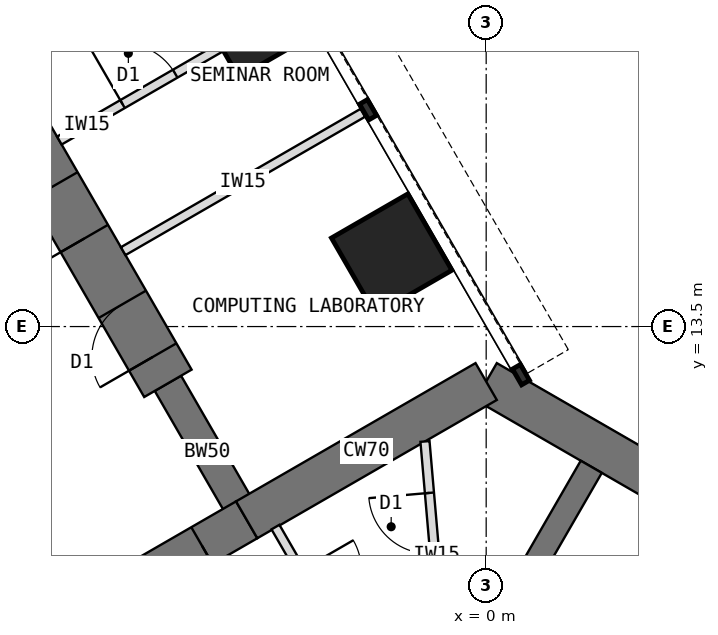
"""IFC4 building model, lengths in metres.
Left out: names, types, materials, properties, quantities, classifications, styles, units other than length and angle.
Written with IfcOpenShell. Run it as: python <this file> out.ifc"""

import sys

from ifc_helpers import new_model, si_unit, direction, frame, frame_2d, origin, origin_2d, place, context, subcontext, project, spatial, rectangle, extrude, element, fill, save


model = new_model("IFC4")
c1 = context("Model", 3, precision=1e-05, world=origin(), true_north=direction((0.0, 1.0)))
c2 = subcontext(c1, "Body", "Model", "MODEL_VIEW")
j1 = project(units=[si_unit("LENGTHUNIT", "METRE"), si_unit("PLANEANGLEUNIT", "RADIAN")], contexts=[c1])
p1 = place(None, origin())
s1 = spatial("IfcSite", under=j1, at=p1, CompositionType="ELEMENT")
p2 = place(p1, origin())
s2 = spatial("IfcBuilding", under=s1, at=p2, CompositionType="ELEMENT")
p3 = place(p2, frame((0.0, 0.0, 60.5)))
s3 = spatial("IfcBuildingStorey", under=s2, at=p3, CompositionType="ELEMENT", Elevation=60.5)
p4 = place(p3, frame((10.908, 6.298, 0.0), z_axis=(0.0, 0.0, 1.0), x_axis=(-0.866021940709, 0.500005998175, 0.0)))
e1 = element("IfcWall", 1, at=p4, inside=s3, PredefinedType="SHEAR", context=c2, shape_type="SweptSolid", body=[
    extrude(rectangle(XDim=12.596, YDim=0.7, at=frame_2d((6.298, 0.0))), origin(), (0.0, 0.0, 1.0), 4.0),
])
p5 = place(p3, frame((0.0, 12.596, 0.0), z_axis=(0.0, 0.0, 1.0), x_axis=(-0.866011268655, -0.500024481964, 0.0)))
e2 = element("IfcWall", 2, at=p5, inside=s3, PredefinedType="SHEAR", context=c2, shape_type="SweptSolid", body=[
    extrude(rectangle(XDim=4.548, YDim=0.7, at=frame_2d((2.274, 0.0))), origin(), (0.0, 0.0, 1.0), 4.0),
])
p6 = place(p3, frame((-3.939, 10.322, 0.0), z_axis=(0.0, 0.0, 1.0), x_axis=(-0.866019471182, -0.500010275428, 0.0)))
e3 = element("IfcWall", 3, at=p6, inside=s3, PredefinedType="SHEAR", context=c2, shape_type="SweptSolid", body=[
    extrude(rectangle(XDim=3.5, YDim=0.7, at=frame_2d((1.75, 0.0))), origin(), (0.0, 0.0, 1.0), 4.0),
])
p7 = place(p6, frame((0.85, 0.0, 0.0)))
e4 = element("IfcOpeningElement", 4, at=p7, cuts=e3, PredefinedType="OPENING", context=c2, shape_type="SweptSolid", body=[
    extrude(rectangle(XDim=1.8, YDim=2.1, at=frame_2d((0.9, 1.05))), frame((0.0, 0.36, 0.0), z_axis=(0.0, -1.0, 0.0), x_axis=(1.0, 0.0, 0.0)), (0.0, 0.0, 1.0), 0.72),
])
for number, where, z_axis, x_axis in (
    (5, (-6.97, 8.572, 0.0), (0.0, 0.0, 1.0), (-0.5, 0.866, 0.0)),
    (6, (-3.939, 10.322, 0.0), (0.0, 0.0, 1.0), (-0.5, 0.866, 0.0)),
):
    element("IfcWall", number, at=place(p3, frame(where, z_axis=z_axis, x_axis=x_axis)), inside=s3, PredefinedType="SHEAR", context=c2, shape_type="SweptSolid", body=[
        extrude(rectangle(XDim=2.592, YDim=0.5, at=frame_2d((1.296, 0.0))), origin(), (0.0, 0.0, 1.0), 4.0),
    ])
p8 = place(p3, frame((-5.234, 12.566, 0.0), z_axis=(0.0, 0.0, 1.0), x_axis=(-0.500010103361, 0.866019570528, 0.0)))
e7 = element("IfcWall", 7, at=p8, inside=s3, PredefinedType="SHEAR", context=c2, shape_type="SweptSolid", body=[
    extrude(rectangle(XDim=13.2, YDim=0.9, at=frame_2d((6.6, 0.0))), origin(), (0.0, 0.0, 1.0), 4.0),
])
p9 = place(p8, frame((0.5, 0.0, 0.0)))
e8 = element("IfcOpeningElement", 8, at=p9, cuts=e7, PredefinedType="OPENING", context=c2, shape_type="SweptSolid", body=[
    extrude(rectangle(XDim=1.0, YDim=2.1, at=frame_2d((0.5, 1.05))), frame((0.0, 0.46, 0.0), z_axis=(0.0, -1.0, 0.0), x_axis=(1.0, 0.0, 0.0)), (0.0, 0.0, 1.0), 0.92),
])
p10 = place(p8, frame((2.75, 0.0, 0.0)))
e9 = element("IfcOpeningElement", 9, at=p10, cuts=e7, PredefinedType="OPENING", context=c2, shape_type="SweptSolid", body=[
    extrude(rectangle(XDim=1.0, YDim=2.1, at=frame_2d((0.5, 1.05))), frame((0.0, 0.46, 0.0), z_axis=(0.0, -1.0, 0.0), x_axis=(1.0, 0.0, 0.0)), (0.0, 0.0, 1.0), 0.92),
])
p11 = place(p8, frame((7.25, 0.0, 0.0)))
e10 = element("IfcOpeningElement", 10, at=p11, cuts=e7, PredefinedType="OPENING", context=c2, shape_type="SweptSolid", body=[
    extrude(rectangle(XDim=1.0, YDim=2.1, at=frame_2d((0.5, 1.05))), frame((0.0, 0.46, 0.0), z_axis=(0.0, -1.0, 0.0), x_axis=(1.0, 0.0, 0.0)), (0.0, 0.0, 1.0), 0.92),
])
for number, where, z_axis, x_axis in (
    (11, (-1.554, 14.691, 0.0), (0.0, 0.0, 1.0), (0.866, 0.5, 0.0)),
    (12, (-3.804, 18.588, 0.0), (0.0, 0.0, 1.0), (0.866, 0.5, 0.0)),
):
    element("IfcColumn", number, at=place(p3, frame(where, z_axis=z_axis, x_axis=x_axis)), inside=s3, PredefinedType="COLUMN", context=c2, shape_type="SweptSolid", body=[
        extrude(rectangle(XDim=1.45, YDim=1.45, at=origin_2d()), origin(), (0.0, 0.0, 1.0), 4.0),
    ])
p12 = place(p3, frame((-1.201, 6.12, 0.0), z_axis=(0.0, 0.0, 1.0), x_axis=(0.500002627198, 0.866023886965, 0.0)))
e13 = element("IfcWall", 13, at=p12, inside=s3, PredefinedType="SHEAR", context=c2, shape_type="SweptSolid", body=[
    extrude(rectangle(XDim=5.858, YDim=0.4, at=frame_2d((2.929, 0.0))), origin(), (0.0, 0.0, 1.0), 4.0),
])
p13 = place(p3, frame((-5.97, 14.74, 0.0), z_axis=(0.0, 0.0, 1.0), x_axis=(0.866035472144, 0.499982560684, 0.0)))
e14 = element("IfcWall", 14, at=p13, inside=s3, PredefinedType="PARTITIONING", context=c2, shape_type="SweptSolid", body=[
    extrude(rectangle(XDim=4.55, YDim=0.15, at=frame_2d((2.275, 0.0))), origin(), (0.0, 0.0, 1.0), 3.8),
])
p14 = place(p3, frame((-7.02, 16.559, 0.0), z_axis=(0.0, 0.0, 1.0), x_axis=(0.866038511948, 0.499977295307, 0.0)))
e15 = element("IfcWall", 15, at=p14, inside=s3, PredefinedType="PARTITIONING", context=c2, shape_type="SweptSolid", body=[
    extrude(rectangle(XDim=3.4, YDim=0.15, at=frame_2d((1.7, 0.0))), origin(), (0.0, 0.0, 1.0), 3.8),
])
p15 = place(p14, frame((1.2, 0.0, 0.0)))
e16 = element("IfcOpeningElement", 16, at=p15, cuts=e15, PredefinedType="OPENING", context=c2, shape_type="SweptSolid", body=[
    extrude(rectangle(XDim=1.0, YDim=2.1, at=frame_2d((0.5, 1.05))), frame((0.0, 0.085, 0.0), z_axis=(0.0, -1.0, 0.0), x_axis=(1.0, 0.0, 0.0)), (0.0, 0.0, 1.0), 0.17),
])
p16 = place(p3, frame((-3.466, 10.202, 0.0), z_axis=(0.0, 0.0, 1.0), x_axis=(0.500007369519, -0.866021148949, 0.0)))
e17 = element("IfcWall", 17, at=p16, inside=s3, PredefinedType="PARTITIONING", context=c2, shape_type="SweptSolid", body=[
    extrude(rectangle(XDim=4.426, YDim=0.15, at=frame_2d((2.213, 0.0))), origin(), (0.0, 0.0, 1.0), 3.8),
])
p17 = place(p16, frame((0.828, 0.0, 0.0)))
e18 = element("IfcOpeningElement", 18, at=p17, cuts=e17, PredefinedType="OPENING", context=c2, shape_type="SweptSolid", body=[
    extrude(rectangle(XDim=1.0, YDim=2.1, at=frame_2d((0.5, 1.05))), frame((0.0, 0.085, 0.0), z_axis=(0.0, -1.0, 0.0), x_axis=(1.0, 0.0, 0.0)), (0.0, 0.0, 1.0), 0.17),
])
p18 = place(p3, frame((-0.618, 7.129, 0.0), z_axis=(0.0, 0.0, 1.0), x_axis=(-0.086409450071, 0.996259708579, 0.0)))
e19 = element("IfcWall", 19, at=p18, inside=s3, PredefinedType="PARTITIONING", context=c2, shape_type="SweptSolid", body=[
    extrude(rectangle(XDim=4.498, YDim=0.15, at=frame_2d((2.249, 0.0))), origin(), (0.0, 0.0, 1.0), 3.8),
])
p19 = place(p18, frame((2.648, 0.0, 0.0)))
e20 = element("IfcOpeningElement", 20, at=p19, cuts=e19, PredefinedType="OPENING", context=c2, shape_type="SweptSolid", body=[
    extrude(rectangle(XDim=1.0, YDim=2.1, at=frame_2d((0.5, 1.05))), frame((0.0, 0.085, 0.0), z_axis=(0.0, -1.0, 0.0), x_axis=(1.0, 0.0, 0.0)), (0.0, 0.0, 1.0), 0.17),
])
p20 = place(p7, origin())
e21 = element("IfcDoor", 21, at=p20, inside=s3, OperationType="DOUBLE_DOOR_DOUBLE_SWING", PredefinedType="DOOR", context=c2, shape_type="SweptSolid", body=[
    extrude(rectangle(XDim=1.72, YDim=2.06, at=frame_2d((0.9, 1.03))), frame((0.0, 0.025, 0.0), z_axis=(0.0, -1.0, 0.0), x_axis=(1.0, 0.0, 0.0)), (0.0, 0.0, 1.0), 0.05),
    extrude(rectangle(XDim=0.04, YDim=2.1, at=frame_2d((0.02, 1.05))), frame((0.0, 0.35, 0.0), z_axis=(0.0, -1.0, 0.0), x_axis=(1.0, 0.0, 0.0)), (0.0, 0.0, 1.0), 0.699),
    extrude(rectangle(XDim=0.04, YDim=2.1, at=frame_2d((1.78, 1.05))), frame((0.0, 0.35, 0.0), z_axis=(0.0, -1.0, 0.0), x_axis=(1.0, 0.0, 0.0)), (0.0, 0.0, 1.0), 0.699),
    extrude(rectangle(XDim=1.72, YDim=0.04, at=frame_2d((0.9, 2.08))), frame((0.0, 0.35, 0.0), z_axis=(0.0, -1.0, 0.0), x_axis=(1.0, 0.0, 0.0)), (0.0, 0.0, 1.0), 0.699),
])
fill(e4, e21)
p21 = place(p15, origin())
e22 = element("IfcDoor", 22, at=p21, inside=s3, OperationType="SINGLE_SWING_LEFT", PredefinedType="DOOR", context=c2, shape_type="SweptSolid", body=[
    extrude(rectangle(XDim=1.0, YDim=2.1, at=frame_2d((0.5, 1.05))), frame((0.0, 0.025, 0.0), z_axis=(0.0, -1.0, 0.0), x_axis=(1.0, 0.0, 0.0)), (0.0, 0.0, 1.0), 0.05),
])
fill(e16, e22)
p22 = place(p19, origin())
e23 = element("IfcDoor", 23, at=p22, inside=s3, OperationType="SINGLE_SWING_RIGHT", PredefinedType="DOOR", context=c2, shape_type="SweptSolid", body=[
    extrude(rectangle(XDim=1.0, YDim=2.1, at=frame_2d((0.5, 1.05))), frame((0.0, 0.025, 0.0), z_axis=(0.0, -1.0, 0.0), x_axis=(1.0, 0.0, 0.0)), (0.0, 0.0, 1.0), 0.05),
])
fill(e20, e23)
p23 = place(p9, origin())
e24 = element("IfcDoor", 24, at=p23, inside=s3, OperationType="SINGLE_SWING_LEFT", PredefinedType="DOOR", context=c2, shape_type="SweptSolid", body=[
    extrude(rectangle(XDim=0.92, YDim=2.06, at=frame_2d((0.5, 1.03))), frame((0.0, 0.025, 0.0), z_axis=(0.0, -1.0, 0.0), x_axis=(1.0, 0.0, 0.0)), (0.0, 0.0, 1.0), 0.05),
    extrude(rectangle(XDim=0.04, YDim=2.1, at=frame_2d((0.02, 1.05))), frame((0.0, 0.45, 0.0), z_axis=(0.0, -1.0, 0.0), x_axis=(1.0, 0.0, 0.0)), (0.0, 0.0, 1.0), 0.899),
    extrude(rectangle(XDim=0.04, YDim=2.1, at=frame_2d((0.98, 1.05))), frame((0.0, 0.45, 0.0), z_axis=(0.0, -1.0, 0.0), x_axis=(1.0, 0.0, 0.0)), (0.0, 0.0, 1.0), 0.899),
    extrude(rectangle(XDim=0.92, YDim=0.04, at=frame_2d((0.5, 2.08))), frame((0.0, 0.45, 0.0), z_axis=(0.0, -1.0, 0.0), x_axis=(1.0, 0.0, 0.0)), (0.0, 0.0, 1.0), 0.899),
])
fill(e8, e24)
p24 = place(p10, origin())
e25 = element("IfcDoor", 25, at=p24, inside=s3, OperationType="SINGLE_SWING_LEFT", PredefinedType="DOOR", context=c2, shape_type="SweptSolid", body=[
    extrude(rectangle(XDim=0.92, YDim=2.06, at=frame_2d((0.5, 1.03))), frame((0.0, 0.025, 0.0), z_axis=(0.0, -1.0, 0.0), x_axis=(1.0, 0.0, 0.0)), (0.0, 0.0, 1.0), 0.05),
    extrude(rectangle(XDim=0.04, YDim=2.1, at=frame_2d((0.02, 1.05))), frame((0.0, 0.45, 0.0), z_axis=(0.0, -1.0, 0.0), x_axis=(1.0, 0.0, 0.0)), (0.0, 0.0, 1.0), 0.899),
    extrude(rectangle(XDim=0.04, YDim=2.1, at=frame_2d((0.98, 1.05))), frame((0.0, 0.45, 0.0), z_axis=(0.0, -1.0, 0.0), x_axis=(1.0, 0.0, 0.0)), (0.0, 0.0, 1.0), 0.899),
    extrude(rectangle(XDim=0.92, YDim=0.04, at=frame_2d((0.5, 2.08))), frame((0.0, 0.45, 0.0), z_axis=(0.0, -1.0, 0.0), x_axis=(1.0, 0.0, 0.0)), (0.0, 0.0, 1.0), 0.899),
])
fill(e9, e25)
save(model, sys.argv[1])
